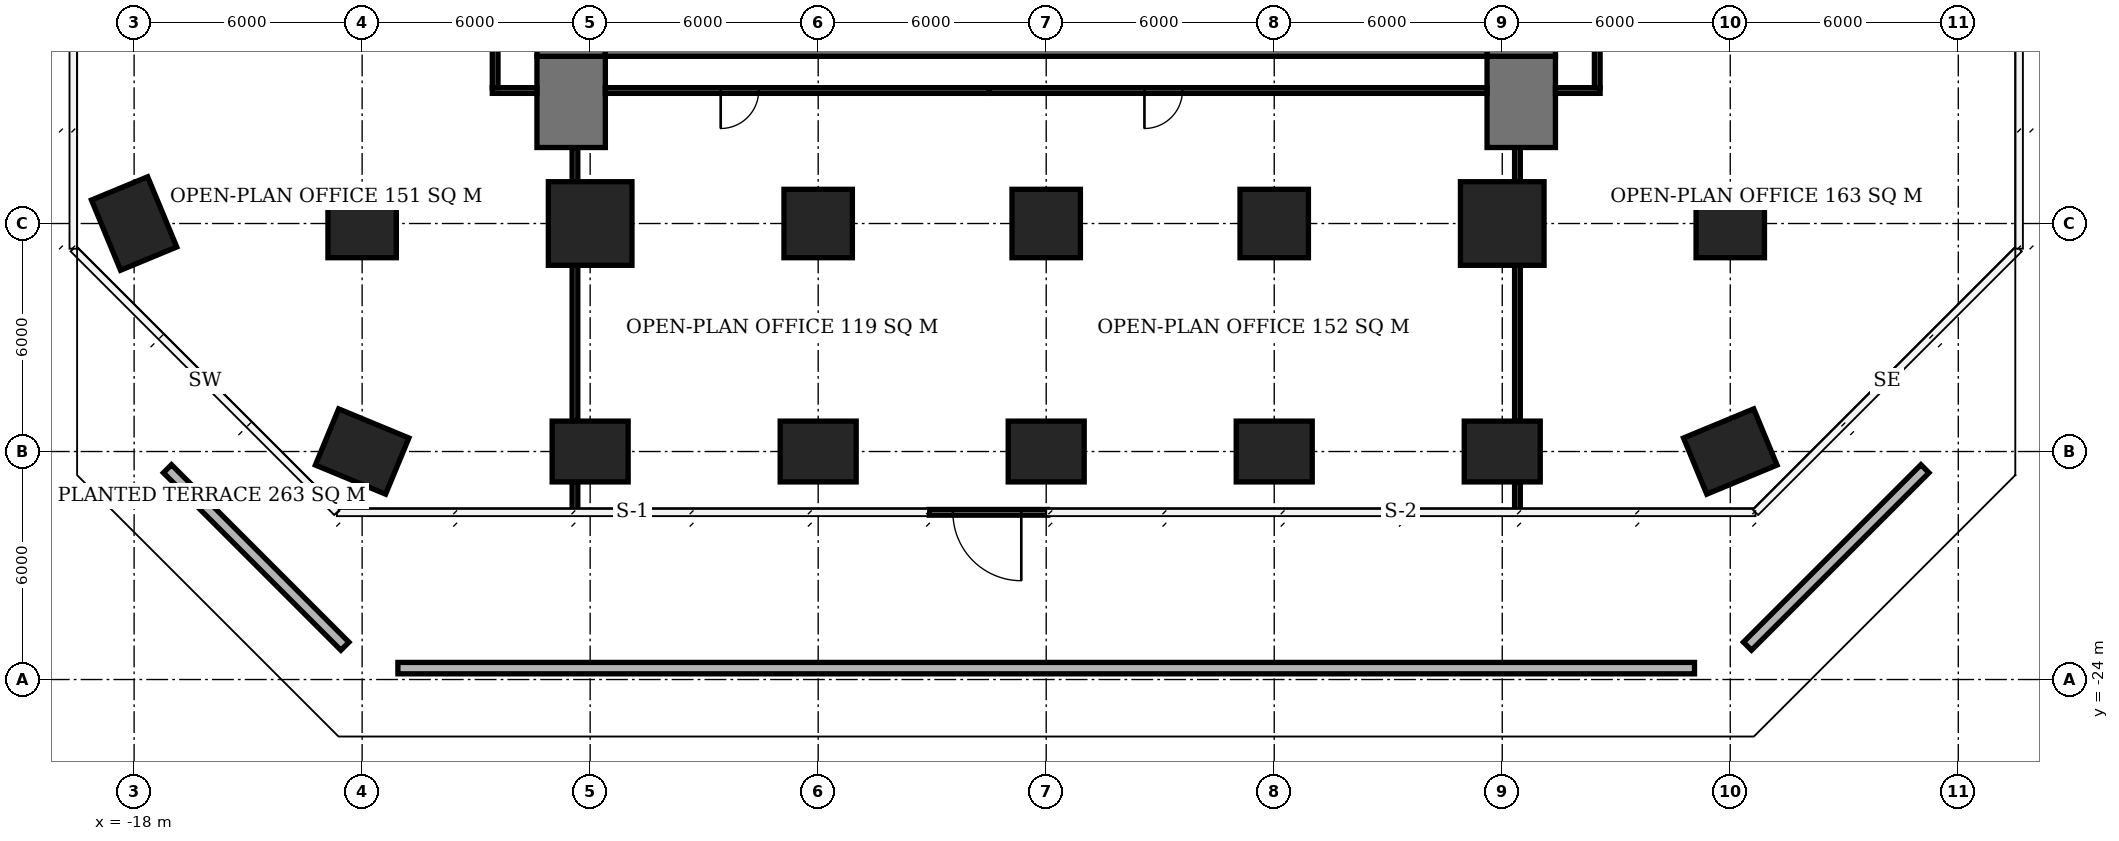
"""IFC4 building model, lengths in metres.
Left out: names, types, materials, properties, quantities, classifications, styles, units other than length and angle.
Written with IfcOpenShell. Run it as: python <this file> out.ifc"""

import sys

from ifc_helpers import new_model, si_unit, direction, frame, frame_2d, origin, origin_2d, place, context, subcontext, project, spatial, rectangle, extrude, element, fill, save


model = new_model("IFC4")
c1 = context("Model", 3, precision=1e-05, world=origin(), true_north=direction((0.0, 1.0)))
c2 = subcontext(c1, "Body", "Model", "MODEL_VIEW")
j1 = project(units=[si_unit("LENGTHUNIT", "METRE"), si_unit("PLANEANGLEUNIT", "RADIAN")], contexts=[c1])
p1 = place(None, origin())
s1 = spatial("IfcSite", under=j1, at=p1, CompositionType="ELEMENT")
p2 = place(p1, origin())
s2 = spatial("IfcBuilding", under=s1, at=p2, CompositionType="ELEMENT")
p3 = place(p2, frame((0.0, 0.0, 65.0)))
s3 = spatial("IfcBuildingStorey", under=s2, at=p3, CompositionType="ELEMENT", Elevation=65.0)
for number, where, z_axis, x_axis in (
    (1, (-18.0, -12.0, 0.0), (0.0, 0.0, 1.0), (-0.383, 0.924, 0.0)),
    (2, (-12.0, -18.0, 0.0), (0.0, 0.0, 1.0), (-0.924, 0.383, 0.0)),
):
    element("IfcColumn", number, at=place(p3, frame(where, z_axis=z_axis, x_axis=x_axis)), inside=s3, PredefinedType="COLUMN", context=c2, shape_type="SweptSolid", body=[
        extrude(rectangle(XDim=2.0, YDim=1.6, at=origin_2d()), origin(), (0.0, 0.0, 1.0), 3.9),
    ])
p4 = place(p3, frame((-12.0, -12.0, 0.0), z_axis=(0.0, 0.0, 1.0), x_axis=(1.0, 0.0, 0.0)))
e3 = element("IfcColumn", 3, at=p4, inside=s3, PredefinedType="COLUMN", context=c2, shape_type="SweptSolid", body=[
    extrude(rectangle(XDim=1.8, YDim=1.8, at=origin_2d()), origin(), (0.0, 0.0, 1.0), 3.9),
])
p5 = place(p3, frame((-6.0, -18.0, 0.0), z_axis=(0.0, 0.0, 1.0), x_axis=(1.0, 0.0, 0.0)))
e4 = element("IfcColumn", 4, at=p5, inside=s3, PredefinedType="COLUMN", context=c2, shape_type="SweptSolid", body=[
    extrude(rectangle(XDim=2.0, YDim=1.6, at=origin_2d()), origin(), (0.0, 0.0, 1.0), 3.9),
])
p6 = place(p3, frame((-6.0, -12.0, 0.0), z_axis=(0.0, 0.0, 1.0), x_axis=(1.0, 0.0, 0.0)))
e5 = element("IfcColumn", 5, at=p6, inside=s3, PredefinedType="COLUMN", context=c2, shape_type="SweptSolid", body=[
    extrude(rectangle(XDim=2.2, YDim=2.2, at=origin_2d()), origin(), (0.0, 0.0, 1.0), 3.9),
])
p7 = place(p3, frame((0.0, -18.0, 0.0), z_axis=(0.0, 0.0, 1.0), x_axis=(1.0, 0.0, 0.0)))
e6 = element("IfcColumn", 6, at=p7, inside=s3, PredefinedType="COLUMN", context=c2, shape_type="SweptSolid", body=[
    extrude(rectangle(XDim=2.0, YDim=1.6, at=origin_2d()), origin(), (0.0, 0.0, 1.0), 3.9),
])
p8 = place(p3, frame((0.0, -12.0, 0.0), z_axis=(0.0, 0.0, 1.0), x_axis=(1.0, 0.0, 0.0)))
e7 = element("IfcColumn", 7, at=p8, inside=s3, PredefinedType="COLUMN", context=c2, shape_type="SweptSolid", body=[
    extrude(rectangle(XDim=1.8, YDim=1.8, at=origin_2d()), origin(), (0.0, 0.0, 1.0), 3.9),
])
p9 = place(p3, frame((6.0, -18.0, 0.0), z_axis=(0.0, 0.0, 1.0), x_axis=(1.0, 0.0, 0.0)))
e8 = element("IfcColumn", 8, at=p9, inside=s3, PredefinedType="COLUMN", context=c2, shape_type="SweptSolid", body=[
    extrude(rectangle(XDim=2.0, YDim=1.6, at=origin_2d()), origin(), (0.0, 0.0, 1.0), 3.9),
])
p10 = place(p3, frame((6.0, -12.0, 0.0), z_axis=(0.0, 0.0, 1.0), x_axis=(1.0, 0.0, 0.0)))
e9 = element("IfcColumn", 9, at=p10, inside=s3, PredefinedType="COLUMN", context=c2, shape_type="SweptSolid", body=[
    extrude(rectangle(XDim=1.8, YDim=1.8, at=origin_2d()), origin(), (0.0, 0.0, 1.0), 3.9),
])
p11 = place(p3, frame((12.0, -18.0, 0.0), z_axis=(0.0, 0.0, 1.0), x_axis=(1.0, 0.0, 0.0)))
e10 = element("IfcColumn", 10, at=p11, inside=s3, PredefinedType="COLUMN", context=c2, shape_type="SweptSolid", body=[
    extrude(rectangle(XDim=2.0, YDim=1.6, at=origin_2d()), origin(), (0.0, 0.0, 1.0), 3.9),
])
p12 = place(p3, frame((12.0, -12.0, 0.0), z_axis=(0.0, 0.0, 1.0), x_axis=(1.0, 0.0, 0.0)))
e11 = element("IfcColumn", 11, at=p12, inside=s3, PredefinedType="COLUMN", context=c2, shape_type="SweptSolid", body=[
    extrude(rectangle(XDim=1.8, YDim=1.8, at=origin_2d()), origin(), (0.0, 0.0, 1.0), 3.9),
])
p13 = place(p3, frame((18.0, -18.0, 0.0), z_axis=(0.0, 0.0, 1.0), x_axis=(1.0, 0.0, 0.0)))
e12 = element("IfcColumn", 12, at=p13, inside=s3, PredefinedType="COLUMN", context=c2, shape_type="SweptSolid", body=[
    extrude(rectangle(XDim=2.0, YDim=1.6, at=origin_2d()), origin(), (0.0, 0.0, 1.0), 3.9),
])
p14 = place(p3, frame((18.0, -12.0, 0.0), z_axis=(0.0, 0.0, 1.0), x_axis=(1.0, 0.0, 0.0)))
e13 = element("IfcColumn", 13, at=p14, inside=s3, PredefinedType="COLUMN", context=c2, shape_type="SweptSolid", body=[
    extrude(rectangle(XDim=2.2, YDim=2.2, at=origin_2d()), origin(), (0.0, 0.0, 1.0), 3.9),
])
p15 = place(p3, frame((24.0, -18.0, 0.0), z_axis=(0.0, 0.0, 1.0), x_axis=(-0.923879532511, -0.382683432365, 0.0)))
e14 = element("IfcColumn", 14, at=p15, inside=s3, PredefinedType="COLUMN", context=c2, shape_type="SweptSolid", body=[
    extrude(rectangle(XDim=2.0, YDim=1.6, at=origin_2d()), origin(), (0.0, 0.0, 1.0), 3.9),
])
p16 = place(p3, frame((24.0, -12.0, 0.0), z_axis=(0.0, 0.0, 1.0), x_axis=(1.0, 0.0, 0.0)))
e15 = element("IfcColumn", 15, at=p16, inside=s3, PredefinedType="COLUMN", context=c2, shape_type="SweptSolid", body=[
    extrude(rectangle(XDim=1.8, YDim=1.8, at=origin_2d()), origin(), (0.0, 0.0, 1.0), 3.9),
])
p17 = place(p3, frame((-5.6, -6.6, 0.0), z_axis=(0.0, 0.0, 1.0), x_axis=(1.0, 0.0, 0.0)))
e16 = element("IfcWall", 16, at=p17, inside=s3, PredefinedType="SHEAR", context=c2, shape_type="SweptSolid", body=[
    extrude(rectangle(XDim=23.2, YDim=2.0, at=frame_2d((11.6, 0.0))), origin(), (0.0, 0.0, 1.0), 3.9),
])
p18 = place(p3, frame((-6.5, -7.6, 0.0), z_axis=(0.0, 0.0, 1.0), x_axis=(0.0, 1.0, 0.0)))
e17 = element("IfcWall", 17, at=p18, inside=s3, PredefinedType="SHEAR", context=c2, shape_type="SweptSolid", body=[
    extrude(rectangle(XDim=21.2, YDim=1.8, at=frame_2d((10.6, 0.0))), origin(), (0.0, 0.0, 1.0), 3.9),
])
p19 = place(p18, frame((7.8, 0.0, 0.0)))
e18 = element("IfcOpeningElement", 18, at=p19, cuts=e17, PredefinedType="OPENING", context=c2, shape_type="SweptSolid", body=[
    extrude(rectangle(XDim=1.8, YDim=2.4, at=frame_2d((0.9, 1.2))), frame((0.0, 0.91, 0.0), z_axis=(0.0, -1.0, 0.0), x_axis=(1.0, 0.0, 0.0)), (0.0, 0.0, 1.0), 1.82),
])
p20 = place(p3, frame((18.5, -7.6, 0.0), z_axis=(0.0, 0.0, 1.0), x_axis=(0.0, 1.0, 0.0)))
e19 = element("IfcWall", 19, at=p20, inside=s3, PredefinedType="SHEAR", context=c2, shape_type="SweptSolid", body=[
    extrude(rectangle(XDim=21.2, YDim=1.8, at=frame_2d((10.6, 0.0))), origin(), (0.0, 0.0, 1.0), 3.9),
])
p21 = place(p20, frame((9.2, 0.0, 0.0)))
e20 = element("IfcOpeningElement", 20, at=p21, cuts=e19, PredefinedType="OPENING", context=c2, shape_type="SweptSolid", body=[
    extrude(rectangle(XDim=1.8, YDim=2.4, at=frame_2d((0.9, 1.2))), frame((0.0, 0.91, 0.0), z_axis=(0.0, -1.0, 0.0), x_axis=(1.0, 0.0, 0.0)), (0.0, 0.0, 1.0), 1.82),
])
for number, where, z_axis, x_axis in (
    (21, (-6.5, -10.0, 0.0), (0.0, 0.0, 1.0), (0.0, 1.0, 0.0)),
    (22, (18.5, -10.0, 0.0), (0.0, 0.0, 1.0), (0.0, 1.0, 0.0)),
):
    element("IfcWall", number, at=place(p3, frame(where, z_axis=z_axis, x_axis=x_axis)), inside=s3, PredefinedType="SHEAR", context=c2, shape_type="SweptSolid", body=[
        extrude(rectangle(XDim=2.4, YDim=1.8, at=frame_2d((1.2, 0.0))), origin(), (0.0, 0.0, 1.0), 3.9),
    ])
p22 = place(p3, frame((6.042, -19.6, 0.0), z_axis=(0.0, 0.0, 1.0), x_axis=(-1.0, 0.0, 0.0)))
e23 = element("IfcWall", 23, at=p22, inside=s3, PredefinedType="USERDEFINED", context=c2, shape_type="SweptSolid", body=[
    extrude(rectangle(XDim=3.12, YDim=0.15, at=frame_2d((1.56, 0.0))), origin(), (0.0, 0.0, 1.0), 3.9),
])
p23 = place(p22, frame((0.698, 0.0, 0.0)))
e24 = element("IfcOpeningElement", 24, at=p23, cuts=e23, PredefinedType="OPENING", context=c2, shape_type="SweptSolid", body=[
    extrude(rectangle(XDim=1.8, YDim=2.4, at=frame_2d((0.9, 1.2))), frame((0.0, 0.085, 0.0), z_axis=(0.0, -1.0, 0.0), x_axis=(1.0, 0.0, 0.0)), (0.0, 0.0, 1.0), 0.17),
])
p24 = place(p3, frame((29.123, -18.453, 0.0), z_axis=(0.0, 0.0, 1.0), x_axis=(-0.707106781187, -0.707106781187, 0.0)))
e25 = element("IfcWall", 25, at=p24, inside=s3, PredefinedType="USERDEFINED", context=c2, shape_type="SweptSolid", body=[
    extrude(rectangle(XDim=6.604, YDim=0.3, at=frame_2d((3.302, 0.0))), origin(), (0.0, 0.0, 1.0), 0.6),
])
p25 = place(p3, frame((23.059, -23.7, 0.0), z_axis=(0.0, 0.0, 1.0), x_axis=(-1.0, 0.0, 0.0)))
e26 = element("IfcWall", 26, at=p25, inside=s3, PredefinedType="USERDEFINED", context=c2, shape_type="SweptSolid", body=[
    extrude(rectangle(XDim=34.118, YDim=0.3, at=frame_2d((17.059, 0.0))), origin(), (0.0, 0.0, 1.0), 0.6),
])
p26 = place(p3, frame((-12.453, -23.123, 0.0), z_axis=(0.0, 0.0, 1.0), x_axis=(-0.707106781187, 0.707106781187, 0.0)))
e27 = element("IfcWall", 27, at=p26, inside=s3, PredefinedType="USERDEFINED", context=c2, shape_type="SweptSolid", body=[
    extrude(rectangle(XDim=6.604, YDim=0.3, at=frame_2d((3.302, 0.0))), origin(), (0.0, 0.0, 1.0), 0.6),
])
p27 = place(p3, frame((-8.5, -8.425, 0.0), z_axis=(0.0, 0.0, 1.0), x_axis=(0.0, 1.0, 0.0)))
e28 = element("IfcWall", 28, at=p27, inside=s3, PredefinedType="PARTITIONING", context=c2, shape_type="SweptSolid", body=[
    extrude(rectangle(XDim=3.85, YDim=0.15, at=frame_2d((1.925, 0.0))), origin(), (0.0, 0.0, 1.0), 3.65),
])
p28 = place(p27, frame((2.025, 0.0, 0.0)))
e29 = element("IfcOpeningElement", 29, at=p28, cuts=e28, PredefinedType="OPENING", context=c2, shape_type="SweptSolid", body=[
    extrude(rectangle(XDim=1.0, YDim=2.1, at=frame_2d((0.5, 1.05))), frame((0.0, 0.085, 0.0), z_axis=(0.0, -1.0, 0.0), x_axis=(1.0, 0.0, 0.0)), (0.0, 0.0, 1.0), 0.17),
])
p29 = place(p3, frame((-8.575, -8.5, 0.0), z_axis=(0.0, 0.0, 1.0), x_axis=(1.0, 0.0, 0.0)))
e30 = element("IfcWall", 30, at=p29, inside=s3, PredefinedType="PARTITIONING", context=c2, shape_type="SweptSolid", body=[
    extrude(rectangle(XDim=1.175, YDim=0.15, at=frame_2d((0.587, 0.0))), origin(), (0.0, 0.0, 1.0), 3.65),
])
p30 = place(p3, frame((-6.4, -19.55, 0.0), z_axis=(0.0, 0.0, 1.0), x_axis=(0.0, 1.0, 0.0)))
e31 = element("IfcWall", 31, at=p30, inside=s3, PredefinedType="PARTITIONING", context=c2, shape_type="SweptSolid", body=[
    extrude(rectangle(XDim=0.75, YDim=0.15, at=frame_2d((0.375, 0.0))), origin(), (0.0, 0.0, 1.0), 3.65),
])
p31 = place(p3, frame((-6.4, -17.2, 0.0), z_axis=(0.0, 0.0, 1.0), x_axis=(0.0, 1.0, 0.0)))
e32 = element("IfcWall", 32, at=p31, inside=s3, PredefinedType="PARTITIONING", context=c2, shape_type="SweptSolid", body=[
    extrude(rectangle(XDim=4.1, YDim=0.15, at=frame_2d((2.05, 0.0))), origin(), (0.0, 0.0, 1.0), 3.65),
])
p32 = place(p3, frame((-6.4, -10.9, 0.0), z_axis=(0.0, 0.0, 1.0), x_axis=(0.0, 1.0, 0.0)))
e33 = element("IfcWall", 33, at=p32, inside=s3, PredefinedType="PARTITIONING", context=c2, shape_type="SweptSolid", body=[
    extrude(rectangle(XDim=0.9, YDim=0.15, at=frame_2d((0.45, 0.0))), origin(), (0.0, 0.0, 1.0), 3.65),
])
p33 = place(p3, frame((4.5, -8.5, 0.0), z_axis=(0.0, 0.0, 1.0), x_axis=(-1.0, 0.0, 0.0)))
e34 = element("IfcWall", 34, at=p33, inside=s3, PredefinedType="PARTITIONING", context=c2, shape_type="SweptSolid", body=[
    extrude(rectangle(XDim=10.1, YDim=0.15, at=frame_2d((5.05, 0.0))), origin(), (0.0, 0.0, 1.0), 3.65),
])
p34 = place(p33, frame((6.065, 0.0, 0.0)))
e35 = element("IfcOpeningElement", 35, at=p34, cuts=e34, PredefinedType="OPENING", context=c2, shape_type="SweptSolid", body=[
    extrude(rectangle(XDim=1.0, YDim=2.1, at=frame_2d((0.5, 1.05))), frame((0.0, 0.085, 0.0), z_axis=(0.0, -1.0, 0.0), x_axis=(1.0, 0.0, 0.0)), (0.0, 0.0, 1.0), 0.17),
])
p35 = place(p3, frame((17.6, -8.5, 0.0), z_axis=(0.0, 0.0, 1.0), x_axis=(-1.0, 0.0, 0.0)))
e36 = element("IfcWall", 36, at=p35, inside=s3, PredefinedType="PARTITIONING", context=c2, shape_type="SweptSolid", body=[
    extrude(rectangle(XDim=13.1, YDim=0.15, at=frame_2d((6.55, 0.0))), origin(), (0.0, 0.0, 1.0), 3.65),
])
p36 = place(p35, frame((8.015, 0.0, 0.0)))
e37 = element("IfcOpeningElement", 37, at=p36, cuts=e36, PredefinedType="OPENING", context=c2, shape_type="SweptSolid", body=[
    extrude(rectangle(XDim=1.0, YDim=2.1, at=frame_2d((0.5, 1.05))), frame((0.0, 0.085, 0.0), z_axis=(0.0, -1.0, 0.0), x_axis=(1.0, 0.0, 0.0)), (0.0, 0.0, 1.0), 0.17),
])
p37 = place(p3, frame((18.4, -19.55, 0.0), z_axis=(0.0, 0.0, 1.0), x_axis=(0.0, 1.0, 0.0)))
e38 = element("IfcWall", 38, at=p37, inside=s3, PredefinedType="PARTITIONING", context=c2, shape_type="SweptSolid", body=[
    extrude(rectangle(XDim=0.75, YDim=0.15, at=frame_2d((0.375, 0.0))), origin(), (0.0, 0.0, 1.0), 3.65),
])
p38 = place(p3, frame((18.4, -17.2, 0.0), z_axis=(0.0, 0.0, 1.0), x_axis=(0.0, 1.0, 0.0)))
e39 = element("IfcWall", 39, at=p38, inside=s3, PredefinedType="PARTITIONING", context=c2, shape_type="SweptSolid", body=[
    extrude(rectangle(XDim=4.1, YDim=0.15, at=frame_2d((2.05, 0.0))), origin(), (0.0, 0.0, 1.0), 3.65),
])
p39 = place(p3, frame((18.4, -10.9, 0.0), z_axis=(0.0, 0.0, 1.0), x_axis=(0.0, 1.0, 0.0)))
e40 = element("IfcWall", 40, at=p39, inside=s3, PredefinedType="PARTITIONING", context=c2, shape_type="SweptSolid", body=[
    extrude(rectangle(XDim=0.9, YDim=0.15, at=frame_2d((0.45, 0.0))), origin(), (0.0, 0.0, 1.0), 3.65),
])
p40 = place(p3, frame((19.4, -8.5, 0.0), z_axis=(0.0, 0.0, 1.0), x_axis=(1.0, 0.0, 0.0)))
e41 = element("IfcWall", 41, at=p40, inside=s3, PredefinedType="PARTITIONING", context=c2, shape_type="SweptSolid", body=[
    extrude(rectangle(XDim=1.175, YDim=0.15, at=frame_2d((0.587, 0.0))), origin(), (0.0, 0.0, 1.0), 3.65),
])
p41 = place(p3, frame((20.5, -8.425, 0.0), z_axis=(0.0, 0.0, 1.0), x_axis=(0.0, 1.0, 0.0)))
e42 = element("IfcWall", 42, at=p41, inside=s3, PredefinedType="PARTITIONING", context=c2, shape_type="SweptSolid", body=[
    extrude(rectangle(XDim=3.85, YDim=0.15, at=frame_2d((1.925, 0.0))), origin(), (0.0, 0.0, 1.0), 3.65),
])
p42 = place(p41, frame((2.025, 0.0, 0.0)))
e43 = element("IfcOpeningElement", 43, at=p42, cuts=e42, PredefinedType="OPENING", context=c2, shape_type="SweptSolid", body=[
    extrude(rectangle(XDim=1.0, YDim=2.1, at=frame_2d((0.5, 1.05))), frame((0.0, 0.085, 0.0), z_axis=(0.0, -1.0, 0.0), x_axis=(1.0, 0.0, 0.0)), (0.0, 0.0, 1.0), 0.17),
])
p43 = place(p23, origin())
e44 = element("IfcDoor", 44, at=p43, inside=s3, OperationType="DOUBLE_DOOR_SINGLE_SWING", PredefinedType="DOOR", context=c2, shape_type="SweptSolid", body=[
    extrude(rectangle(XDim=1.8, YDim=2.4, at=frame_2d((0.9, 1.2))), frame((0.0, 0.025, 0.0), z_axis=(0.0, -1.0, 0.0), x_axis=(1.0, 0.0, 0.0)), (0.0, 0.0, 1.0), 0.05),
])
fill(e24, e44)
p44 = place(p34, origin())
e45 = element("IfcDoor", 45, at=p44, inside=s3, OperationType="SINGLE_SWING_RIGHT", PredefinedType="DOOR", context=c2, shape_type="SweptSolid", body=[
    extrude(rectangle(XDim=1.0, YDim=2.1, at=frame_2d((0.5, 1.05))), frame((0.0, 0.025, 0.0), z_axis=(0.0, -1.0, 0.0), x_axis=(1.0, 0.0, 0.0)), (0.0, 0.0, 1.0), 0.05),
])
fill(e35, e45)
p45 = place(p36, origin())
e46 = element("IfcDoor", 46, at=p45, inside=s3, OperationType="SINGLE_SWING_RIGHT", PredefinedType="DOOR", context=c2, shape_type="SweptSolid", body=[
    extrude(rectangle(XDim=1.0, YDim=2.1, at=frame_2d((0.5, 1.05))), frame((0.0, 0.025, 0.0), z_axis=(0.0, -1.0, 0.0), x_axis=(1.0, 0.0, 0.0)), (0.0, 0.0, 1.0), 0.05),
])
fill(e37, e46)
save(model, sys.argv[1])
